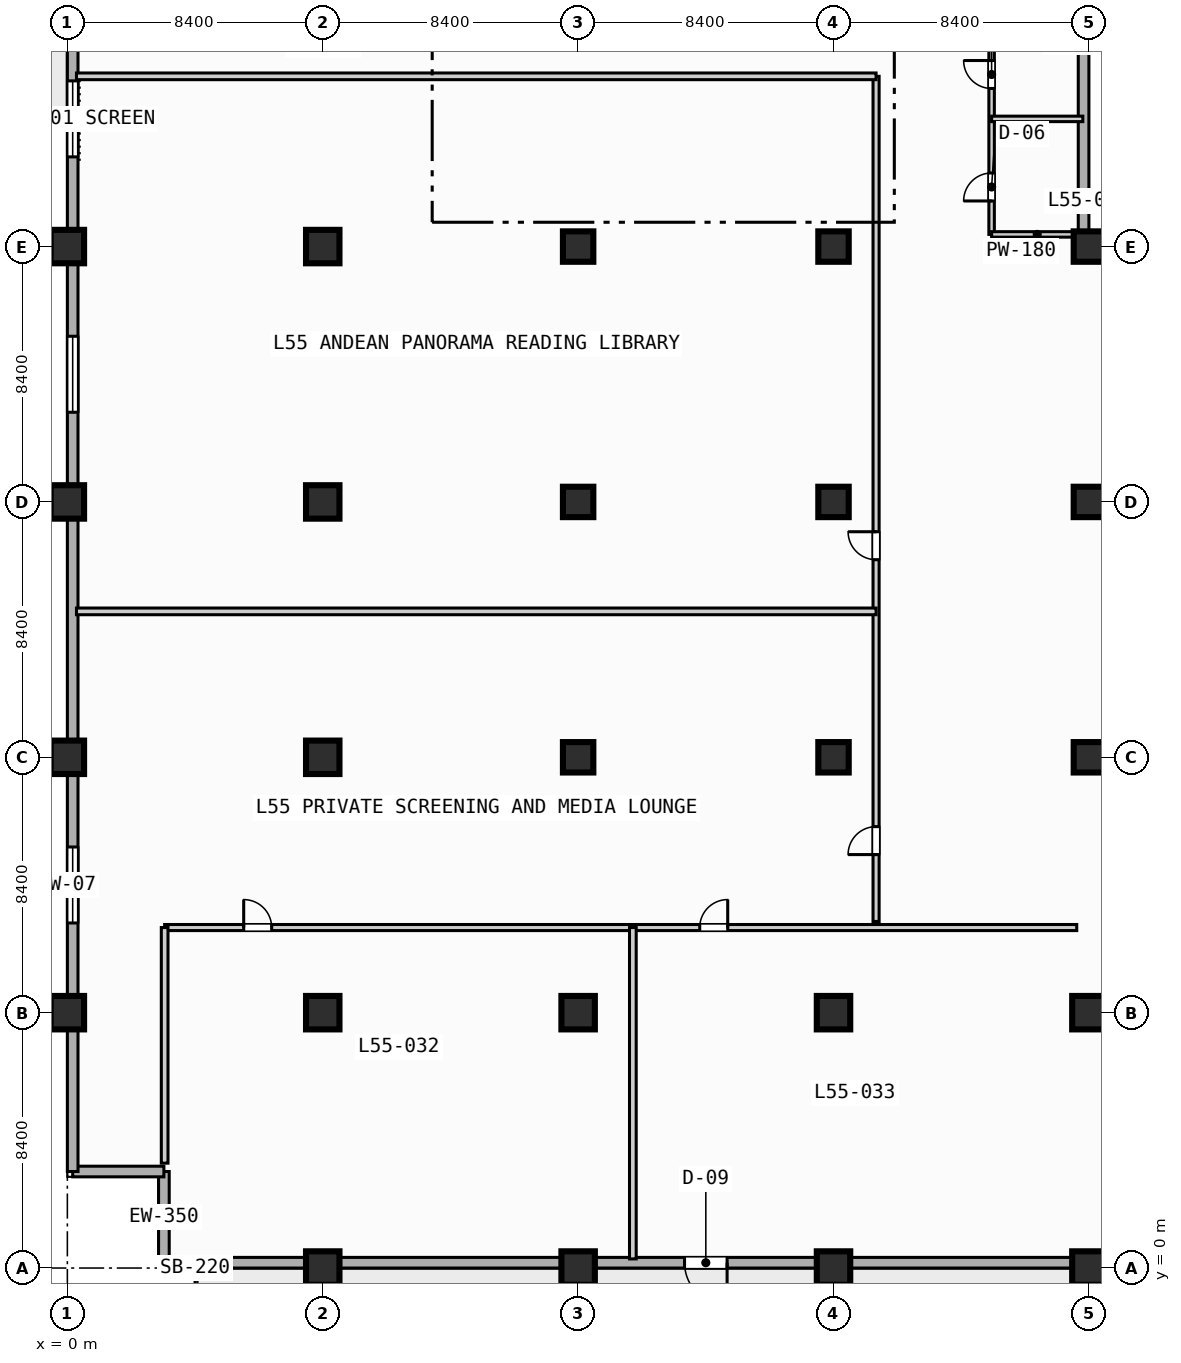
"""IFC4 building model, lengths in metres.
Left out: names, types, materials, properties, quantities, classifications, styles, units other than length and angle.
Written with IfcOpenShell. Run it as: python <this file> out.ifc"""

import sys

from ifc_helpers import new_model, si_unit, direction, frame, frame_2d, origin, origin_2d, place, context, subcontext, project, spatial, rectangle, extrude, element, fill, save


model = new_model("IFC4")
c1 = context("Model", 3, precision=1e-05, world=origin(), true_north=direction((0.0, 1.0)))
c2 = subcontext(c1, "Body", "Model", "MODEL_VIEW")
j1 = project(units=[si_unit("LENGTHUNIT", "METRE"), si_unit("PLANEANGLEUNIT", "RADIAN")], contexts=[c1])
p1 = place(None, origin())
s1 = spatial("IfcSite", under=j1, at=p1, CompositionType="ELEMENT")
p2 = place(p1, origin())
s2 = spatial("IfcBuilding", under=s1, at=p2, CompositionType="ELEMENT")
p3 = place(p2, frame((0.0, 0.0, 224.0)))
s3 = spatial("IfcBuildingStorey", under=s2, at=p3, CompositionType="ELEMENT", Elevation=224.0)
for number, where, z_axis, x_axis in (
    (1, (0.0, 8.4, 0.0), (0.0, 0.0, 1.0), (1.0, 0.0, 0.0)),
    (2, (0.0, 16.8, 0.0), (0.0, 0.0, 1.0), (1.0, 0.0, 0.0)),
    (3, (0.0, 25.2, 0.0), (0.0, 0.0, 1.0), (1.0, 0.0, 0.0)),
    (4, (0.0, 33.6, 0.0), (0.0, 0.0, 1.0), (1.0, 0.0, 0.0)),
    (5, (8.4, 0.0, 0.0), (0.0, 0.0, 1.0), (1.0, 0.0, 0.0)),
    (6, (8.4, 8.4, 0.0), (0.0, 0.0, 1.0), (1.0, 0.0, 0.0)),
    (7, (8.4, 16.8, 0.0), (0.0, 0.0, 1.0), (1.0, 0.0, 0.0)),
    (8, (8.4, 25.2, 0.0), (0.0, 0.0, 1.0), (1.0, 0.0, 0.0)),
    (9, (8.4, 33.6, 0.0), (0.0, 0.0, 1.0), (1.0, 0.0, 0.0)),
    (10, (16.8, 0.0, 0.0), (0.0, 0.0, 1.0), (1.0, 0.0, 0.0)),
    (11, (16.8, 8.4, 0.0), (0.0, 0.0, 1.0), (1.0, 0.0, 0.0)),
):
    element("IfcColumn", number, at=place(p3, frame(where, z_axis=z_axis, x_axis=x_axis)), inside=s3, PredefinedType="COLUMN", context=c2, shape_type="SweptSolid", body=[
        extrude(rectangle(XDim=1.1, YDim=1.1, at=origin_2d()), origin(), (0.0, 0.0, 1.0), 4.2),
    ])
for number, where, z_axis, x_axis in (
    (12, (16.8, 16.8, 0.0), (0.0, 0.0, 1.0), (1.0, 0.0, 0.0)),
    (13, (16.8, 25.2, 0.0), (0.0, 0.0, 1.0), (1.0, 0.0, 0.0)),
    (14, (16.8, 33.6, 0.0), (0.0, 0.0, 1.0), (1.0, 0.0, 0.0)),
):
    element("IfcColumn", number, at=place(p3, frame(where, z_axis=z_axis, x_axis=x_axis)), inside=s3, PredefinedType="COLUMN", context=c2, shape_type="SweptSolid", body=[
        extrude(rectangle(XDim=1.0, YDim=1.0, at=origin_2d()), origin(), (0.0, 0.0, 1.0), 4.2),
    ])
for number, where, z_axis, x_axis in (
    (15, (25.2, 0.0, 0.0), (0.0, 0.0, 1.0), (1.0, 0.0, 0.0)),
    (16, (25.2, 8.4, 0.0), (0.0, 0.0, 1.0), (1.0, 0.0, 0.0)),
):
    element("IfcColumn", number, at=place(p3, frame(where, z_axis=z_axis, x_axis=x_axis)), inside=s3, PredefinedType="COLUMN", context=c2, shape_type="SweptSolid", body=[
        extrude(rectangle(XDim=1.1, YDim=1.1, at=origin_2d()), origin(), (0.0, 0.0, 1.0), 4.2),
    ])
for number, where, z_axis, x_axis in (
    (17, (25.2, 16.8, 0.0), (0.0, 0.0, 1.0), (1.0, 0.0, 0.0)),
    (18, (25.2, 25.2, 0.0), (0.0, 0.0, 1.0), (1.0, 0.0, 0.0)),
    (19, (25.2, 33.6, 0.0), (0.0, 0.0, 1.0), (1.0, 0.0, 0.0)),
):
    element("IfcColumn", number, at=place(p3, frame(where, z_axis=z_axis, x_axis=x_axis)), inside=s3, PredefinedType="COLUMN", context=c2, shape_type="SweptSolid", body=[
        extrude(rectangle(XDim=1.0, YDim=1.0, at=origin_2d()), origin(), (0.0, 0.0, 1.0), 4.2),
    ])
for number, where, z_axis, x_axis in (
    (20, (33.6, 0.0, 0.0), (0.0, 0.0, 1.0), (1.0, 0.0, 0.0)),
    (21, (33.6, 8.4, 0.0), (0.0, 0.0, 1.0), (1.0, 0.0, 0.0)),
):
    element("IfcColumn", number, at=place(p3, frame(where, z_axis=z_axis, x_axis=x_axis)), inside=s3, PredefinedType="COLUMN", context=c2, shape_type="SweptSolid", body=[
        extrude(rectangle(XDim=1.1, YDim=1.1, at=origin_2d()), origin(), (0.0, 0.0, 1.0), 4.2),
    ])
for number, where, z_axis, x_axis in (
    (22, (33.6, 16.8, 0.0), (0.0, 0.0, 1.0), (1.0, 0.0, 0.0)),
    (23, (33.6, 25.2, 0.0), (0.0, 0.0, 1.0), (1.0, 0.0, 0.0)),
    (24, (33.6, 33.6, 0.0), (0.0, 0.0, 1.0), (1.0, 0.0, 0.0)),
):
    element("IfcColumn", number, at=place(p3, frame(where, z_axis=z_axis, x_axis=x_axis)), inside=s3, PredefinedType="COLUMN", context=c2, shape_type="SweptSolid", body=[
        extrude(rectangle(XDim=1.0, YDim=1.0, at=origin_2d()), origin(), (0.0, 0.0, 1.0), 4.2),
    ])
for number, where, z_axis, x_axis in (
    (25, (3.175, 0.175, 0.0), (0.0, 0.0, 1.0), (0.0, 1.0, 0.0)),
    (26, (3.175, 3.175, 0.0), (0.0, 0.0, 1.0), (-1.0, 0.0, 0.0)),
):
    element("IfcWall", number, at=place(p3, frame(where, z_axis=z_axis, x_axis=x_axis)), inside=s3, PredefinedType="STANDARD", context=c2, shape_type="SweptSolid", body=[
        extrude(rectangle(XDim=3.0, YDim=0.35, at=frame_2d((1.5, 0.0))), origin(), (0.0, 0.0, 1.0), 3.75),
    ])
p4 = place(p3, frame((0.175, 3.175, 0.0), z_axis=(0.0, 0.0, 1.0), x_axis=(0.0, 1.0, 0.0)))
e27 = element("IfcWall", 27, at=p4, inside=s3, PredefinedType="STANDARD", context=c2, shape_type="SweptSolid", body=[
    extrude(rectangle(XDim=69.25, YDim=0.35, at=frame_2d((34.625, 0.0))), origin(), (0.0, 0.0, 1.0), 3.75),
])
p5 = place(p4, frame((42.325, 0.0, 0.0)))
e28 = element("IfcOpeningElement", 28, at=p5, cuts=e27, PredefinedType="OPENING", context=c2, shape_type="SweptSolid", body=[
    extrude(rectangle(XDim=1.4, YDim=2.2, at=frame_2d((0.7, 1.1))), frame((0.0, 0.185, 0.0), z_axis=(0.0, -1.0, 0.0), x_axis=(1.0, 0.0, 0.0)), (0.0, 0.0, 1.0), 0.37),
])
p6 = place(p4, frame((8.175, 0.0, 0.85)))
e29 = element("IfcOpeningElement", 29, at=p6, cuts=e27, PredefinedType="OPENING", context=c2, shape_type="SweptSolid", body=[
    extrude(rectangle(XDim=2.5, YDim=2.2, at=frame_2d((1.25, 1.1))), frame((0.0, 0.185, 0.0), z_axis=(0.0, -1.0, 0.0), x_axis=(1.0, 0.0, 0.0)), (0.0, 0.0, 1.0), 0.37),
])
p7 = place(p4, frame((24.975, 0.0, 0.85)))
e30 = element("IfcOpeningElement", 30, at=p7, cuts=e27, PredefinedType="OPENING", context=c2, shape_type="SweptSolid", body=[
    extrude(rectangle(XDim=2.5, YDim=2.2, at=frame_2d((1.25, 1.1))), frame((0.0, 0.185, 0.0), z_axis=(0.0, -1.0, 0.0), x_axis=(1.0, 0.0, 0.0)), (0.0, 0.0, 1.0), 0.37),
])
p8 = place(p4, frame((33.375, 0.0, 0.85)))
e31 = element("IfcOpeningElement", 31, at=p8, cuts=e27, PredefinedType="OPENING", context=c2, shape_type="SweptSolid", body=[
    extrude(rectangle(XDim=2.5, YDim=2.2, at=frame_2d((1.25, 1.1))), frame((0.0, 0.185, 0.0), z_axis=(0.0, -1.0, 0.0), x_axis=(1.0, 0.0, 0.0)), (0.0, 0.0, 1.0), 0.37),
])
p9 = place(p3, frame((33.425, 72.425, 0.0), z_axis=(0.0, 0.0, 1.0), x_axis=(0.0, -1.0, 0.0)))
e32 = element("IfcWall", 32, at=p9, inside=s3, PredefinedType="STANDARD", context=c2, shape_type="SweptSolid", body=[
    extrude(rectangle(XDim=39.0, YDim=0.35, at=frame_2d((19.5, 0.0))), origin(), (0.0, 0.0, 1.0), 3.75),
])
p10 = place(p3, frame((33.425, 33.425, 0.0), z_axis=(0.0, 0.0, 1.0), x_axis=(1.0, 0.0, 0.0)))
e33 = element("IfcWall", 33, at=p10, inside=s3, PredefinedType="STANDARD", context=c2, shape_type="SweptSolid", body=[
    extrude(rectangle(XDim=39.0, YDim=0.35, at=frame_2d((19.5, 0.0))), origin(), (0.0, 0.0, 1.0), 3.75),
])
p11 = place(p10, frame((12.075, 0.0, 0.0)))
e34 = element("IfcOpeningElement", 34, at=p11, cuts=e33, PredefinedType="OPENING", context=c2, shape_type="SweptSolid", body=[
    extrude(rectangle(XDim=1.4, YDim=2.2, at=frame_2d((0.7, 1.1))), frame((0.0, 0.185, 0.0), z_axis=(0.0, -1.0, 0.0), x_axis=(1.0, 0.0, 0.0)), (0.0, 0.0, 1.0), 0.37),
])
p12 = place(p3, frame((72.425, 0.175, 0.0), z_axis=(0.0, 0.0, 1.0), x_axis=(-1.0, 0.0, 0.0)))
e35 = element("IfcWall", 35, at=p12, inside=s3, PredefinedType="STANDARD", context=c2, shape_type="SweptSolid", body=[
    extrude(rectangle(XDim=69.25, YDim=0.35, at=frame_2d((34.625, 0.0))), origin(), (0.0, 0.0, 1.0), 3.75),
])
p13 = place(p12, frame((50.725, 0.0, 0.0)))
e36 = element("IfcOpeningElement", 36, at=p13, cuts=e35, PredefinedType="OPENING", context=c2, shape_type="SweptSolid", body=[
    extrude(rectangle(XDim=1.4, YDim=2.2, at=frame_2d((0.7, 1.1))), frame((0.0, 0.185, 0.0), z_axis=(0.0, -1.0, 0.0), x_axis=(1.0, 0.0, 0.0)), (0.0, 0.0, 1.0), 0.37),
])
p14 = place(p12, frame((24.975, 0.0, 0.85)))
e37 = element("IfcOpeningElement", 37, at=p14, cuts=e35, PredefinedType="OPENING", context=c2, shape_type="SweptSolid", body=[
    extrude(rectangle(XDim=2.5, YDim=2.2, at=frame_2d((1.25, 1.1))), frame((0.0, 0.185, 0.0), z_axis=(0.0, -1.0, 0.0), x_axis=(1.0, 0.0, 0.0)), (0.0, 0.0, 1.0), 0.37),
])
p15 = place(p12, frame((8.175, 0.0, 0.85)))
e38 = element("IfcOpeningElement", 38, at=p15, cuts=e35, PredefinedType="OPENING", context=c2, shape_type="SweptSolid", body=[
    extrude(rectangle(XDim=2.5, YDim=2.2, at=frame_2d((1.25, 1.1))), frame((0.0, 0.185, 0.0), z_axis=(0.0, -1.0, 0.0), x_axis=(1.0, 0.0, 0.0)), (0.0, 0.0, 1.0), 0.37),
])
p16 = place(p3, frame((30.4, 34.0, 0.0), z_axis=(0.0, 0.0, 1.0), x_axis=(0.0, 1.0, 0.0)))
e39 = element("IfcWall", 39, at=p16, inside=s3, PredefinedType="PLUMBINGWALL", context=c2, shape_type="SweptSolid", body=[
    extrude(rectangle(XDim=7.6, YDim=0.18, at=frame_2d((3.8, 0.0))), origin(), (0.0, 0.0, 1.0), 3.75),
])
p17 = place(p16, frame((1.1, 0.0, 0.0)))
e40 = element("IfcOpeningElement", 40, at=p17, cuts=e39, PredefinedType="OPENING", context=c2, shape_type="SweptSolid", body=[
    extrude(rectangle(XDim=0.92, YDim=2.1, at=frame_2d((0.46, 1.05))), frame((0.0, 0.1, 0.0), z_axis=(0.0, -1.0, 0.0), x_axis=(1.0, 0.0, 0.0)), (0.0, 0.0, 1.0), 0.2),
])
p18 = place(p16, frame((4.8, 0.0, 0.0)))
e41 = element("IfcOpeningElement", 41, at=p18, cuts=e39, PredefinedType="OPENING", context=c2, shape_type="SweptSolid", body=[
    extrude(rectangle(XDim=0.92, YDim=2.1, at=frame_2d((0.46, 1.05))), frame((0.0, 0.1, 0.0), z_axis=(0.0, -1.0, 0.0), x_axis=(1.0, 0.0, 0.0)), (0.0, 0.0, 1.0), 0.2),
])
for number, where, z_axis, x_axis in (
    (42, (30.4, 34.0, 0.0), (0.0, 0.0, 1.0), (1.0, 0.0, 0.0)),
    (43, (30.4, 37.8, 0.0), (0.0, 0.0, 1.0), (1.0, 0.0, 0.0)),
):
    element("IfcWall", number, at=place(p3, frame(where, z_axis=z_axis, x_axis=x_axis)), inside=s3, PredefinedType="PLUMBINGWALL", context=c2, shape_type="SweptSolid", body=[
        extrude(rectangle(XDim=3.0, YDim=0.18, at=frame_2d((1.5, 0.0))), origin(), (0.0, 0.0, 1.0), 3.75),
    ])
p19 = place(p3, frame((3.2, 11.2, 0.0), z_axis=(0.0, 0.0, 1.0), x_axis=(1.0, 0.0, 0.0)))
e44 = element("IfcWall", 44, at=p19, inside=s3, PredefinedType="PARTITIONING", context=c2, shape_type="SweptSolid", body=[
    extrude(rectangle(XDim=30.0, YDim=0.2, at=frame_2d((15.0, 0.0))), origin(), (0.0, 0.0, 1.0), 3.75),
])
p20 = place(p19, frame((2.6, 0.0, 0.0)))
e45 = element("IfcOpeningElement", 45, at=p20, cuts=e44, PredefinedType="OPENING", context=c2, shape_type="SweptSolid", body=[
    extrude(rectangle(XDim=0.92, YDim=2.1, at=frame_2d((0.46, 1.05))), frame((0.0, 0.11, 0.0), z_axis=(0.0, -1.0, 0.0), x_axis=(1.0, 0.0, 0.0)), (0.0, 0.0, 1.0), 0.22),
])
p21 = place(p19, frame((17.6, 0.0, 0.0)))
e46 = element("IfcOpeningElement", 46, at=p21, cuts=e44, PredefinedType="OPENING", context=c2, shape_type="SweptSolid", body=[
    extrude(rectangle(XDim=0.92, YDim=2.1, at=frame_2d((0.46, 1.05))), frame((0.0, 0.11, 0.0), z_axis=(0.0, -1.0, 0.0), x_axis=(1.0, 0.0, 0.0)), (0.0, 0.0, 1.0), 0.22),
])
p22 = place(p3, frame((3.2, 3.45, 0.0), z_axis=(0.0, 0.0, 1.0), x_axis=(0.0, 1.0, 0.0)))
e47 = element("IfcWall", 47, at=p22, inside=s3, PredefinedType="PARTITIONING", context=c2, shape_type="SweptSolid", body=[
    extrude(rectangle(XDim=7.75, YDim=0.22, at=frame_2d((3.875, 0.0))), origin(), (0.0, 0.0, 1.0), 3.75),
])
p23 = place(p3, frame((18.6, 0.3, 0.0), z_axis=(0.0, 0.0, 1.0), x_axis=(0.0, 1.0, 0.0)))
e48 = element("IfcWall", 48, at=p23, inside=s3, PredefinedType="PARTITIONING", context=c2, shape_type="SweptSolid", body=[
    extrude(rectangle(XDim=10.9, YDim=0.22, at=frame_2d((5.45, 0.0))), origin(), (0.0, 0.0, 1.0), 3.75),
])
p24 = place(p3, frame((26.6, 11.4, 0.0), z_axis=(0.0, 0.0, 1.0), x_axis=(0.0, 1.0, 0.0)))
e49 = element("IfcWall", 49, at=p24, inside=s3, PredefinedType="PARTITIONING", context=c2, shape_type="SweptSolid", body=[
    extrude(rectangle(XDim=27.8, YDim=0.2, at=frame_2d((13.9, 0.0))), origin(), (0.0, 0.0, 1.0), 3.75),
])
p25 = place(p24, frame((2.2, 0.0, 0.0)))
e50 = element("IfcOpeningElement", 50, at=p25, cuts=e49, PredefinedType="OPENING", context=c2, shape_type="SweptSolid", body=[
    extrude(rectangle(XDim=0.92, YDim=2.1, at=frame_2d((0.46, 1.05))), frame((0.0, 0.11, 0.0), z_axis=(0.0, -1.0, 0.0), x_axis=(1.0, 0.0, 0.0)), (0.0, 0.0, 1.0), 0.22),
])
p26 = place(p24, frame((11.9, 0.0, 0.0)))
e51 = element("IfcOpeningElement", 51, at=p26, cuts=e49, PredefinedType="OPENING", context=c2, shape_type="SweptSolid", body=[
    extrude(rectangle(XDim=0.92, YDim=2.1, at=frame_2d((0.46, 1.05))), frame((0.0, 0.11, 0.0), z_axis=(0.0, -1.0, 0.0), x_axis=(1.0, 0.0, 0.0)), (0.0, 0.0, 1.0), 0.22),
])
for number, where, z_axis, x_axis in (
    (52, (0.3, 21.6, 0.0), (0.0, 0.0, 1.0), (1.0, 0.0, 0.0)),
    (53, (0.3, 39.2, 0.0), (0.0, 0.0, 1.0), (1.0, 0.0, 0.0)),
):
    element("IfcWall", number, at=place(p3, frame(where, z_axis=z_axis, x_axis=x_axis)), inside=s3, PredefinedType="PARTITIONING", context=c2, shape_type="SweptSolid", body=[
        extrude(rectangle(XDim=26.3, YDim=0.22, at=frame_2d((13.15, 0.0))), origin(), (0.0, 0.0, 1.0), 3.75),
    ])
p27 = place(p6, origin())
e54 = element("IfcWindow", 54, at=p27, inside=s3, PartitioningType="SINGLE_PANEL", PredefinedType="WINDOW", context=c2, shape_type="SweptSolid", body=[
    extrude(rectangle(XDim=2.5, YDim=2.2, at=frame_2d((1.25, 1.1))), frame((0.0, 0.03, 0.0), z_axis=(0.0, -1.0, 0.0), x_axis=(1.0, 0.0, 0.0)), (0.0, 0.0, 1.0), 0.06),
])
fill(e29, e54)
p28 = place(p7, origin())
e55 = element("IfcWindow", 55, at=p28, inside=s3, PartitioningType="SINGLE_PANEL", PredefinedType="WINDOW", context=c2, shape_type="SweptSolid", body=[
    extrude(rectangle(XDim=2.5, YDim=2.2, at=frame_2d((1.25, 1.1))), frame((0.0, 0.03, 0.0), z_axis=(0.0, -1.0, 0.0), x_axis=(1.0, 0.0, 0.0)), (0.0, 0.0, 1.0), 0.06),
])
fill(e30, e55)
p29 = place(p8, origin())
e56 = element("IfcWindow", 56, at=p29, inside=s3, PartitioningType="SINGLE_PANEL", PredefinedType="WINDOW", context=c2, shape_type="SweptSolid", body=[
    extrude(rectangle(XDim=2.5, YDim=2.2, at=frame_2d((1.25, 1.1))), frame((0.0, 0.03, 0.0), z_axis=(0.0, -1.0, 0.0), x_axis=(1.0, 0.0, 0.0)), (0.0, 0.0, 1.0), 0.06),
])
fill(e31, e56)
p30 = place(p13, origin())
e57 = element("IfcDoor", 57, at=p30, inside=s3, OperationType="SINGLE_SWING_LEFT", PredefinedType="DOOR", context=c2, shape_type="SweptSolid", body=[
    extrude(rectangle(XDim=1.4, YDim=2.2, at=frame_2d((0.7, 1.1))), frame((0.0, 0.025, 0.0), z_axis=(0.0, -1.0, 0.0), x_axis=(1.0, 0.0, 0.0)), (0.0, 0.0, 1.0), 0.05),
])
fill(e36, e57)
p31 = place(p17, origin())
e58 = element("IfcDoor", 58, at=p31, inside=s3, OperationType="SINGLE_SWING_LEFT", PredefinedType="DOOR", context=c2, shape_type="SweptSolid", body=[
    extrude(rectangle(XDim=0.92, YDim=2.1, at=frame_2d((0.46, 1.05))), frame((0.0, 0.025, 0.0), z_axis=(0.0, -1.0, 0.0), x_axis=(1.0, 0.0, 0.0)), (0.0, 0.0, 1.0), 0.05),
])
fill(e40, e58)
p32 = place(p18, origin())
e59 = element("IfcDoor", 59, at=p32, inside=s3, OperationType="SINGLE_SWING_RIGHT", PredefinedType="DOOR", context=c2, shape_type="SweptSolid", body=[
    extrude(rectangle(XDim=0.92, YDim=2.1, at=frame_2d((0.46, 1.05))), frame((0.0, 0.025, 0.0), z_axis=(0.0, -1.0, 0.0), x_axis=(1.0, 0.0, 0.0)), (0.0, 0.0, 1.0), 0.05),
])
fill(e41, e59)
p33 = place(p20, origin())
e60 = element("IfcDoor", 60, at=p33, inside=s3, OperationType="SINGLE_SWING_LEFT", PredefinedType="DOOR", context=c2, shape_type="SweptSolid", body=[
    extrude(rectangle(XDim=0.92, YDim=2.1, at=frame_2d((0.46, 1.05))), frame((0.0, 0.025, 0.0), z_axis=(0.0, -1.0, 0.0), x_axis=(1.0, 0.0, 0.0)), (0.0, 0.0, 1.0), 0.05),
])
fill(e45, e60)
p34 = place(p21, origin())
e61 = element("IfcDoor", 61, at=p34, inside=s3, OperationType="SINGLE_SWING_RIGHT", PredefinedType="DOOR", context=c2, shape_type="SweptSolid", body=[
    extrude(rectangle(XDim=0.92, YDim=2.1, at=frame_2d((0.46, 1.05))), frame((0.0, 0.025, 0.0), z_axis=(0.0, -1.0, 0.0), x_axis=(1.0, 0.0, 0.0)), (0.0, 0.0, 1.0), 0.05),
])
fill(e46, e61)
p35 = place(p25, origin())
e62 = element("IfcDoor", 62, at=p35, inside=s3, OperationType="SINGLE_SWING_LEFT", PredefinedType="DOOR", context=c2, shape_type="SweptSolid", body=[
    extrude(rectangle(XDim=0.92, YDim=2.1, at=frame_2d((0.46, 1.05))), frame((0.0, 0.025, 0.0), z_axis=(0.0, -1.0, 0.0), x_axis=(1.0, 0.0, 0.0)), (0.0, 0.0, 1.0), 0.05),
])
fill(e50, e62)
p36 = place(p26, origin())
e63 = element("IfcDoor", 63, at=p36, inside=s3, OperationType="SINGLE_SWING_RIGHT", PredefinedType="DOOR", context=c2, shape_type="SweptSolid", body=[
    extrude(rectangle(XDim=0.92, YDim=2.1, at=frame_2d((0.46, 1.05))), frame((0.0, 0.025, 0.0), z_axis=(0.0, -1.0, 0.0), x_axis=(1.0, 0.0, 0.0)), (0.0, 0.0, 1.0), 0.05),
])
fill(e51, e63)
save(model, sys.argv[1])
